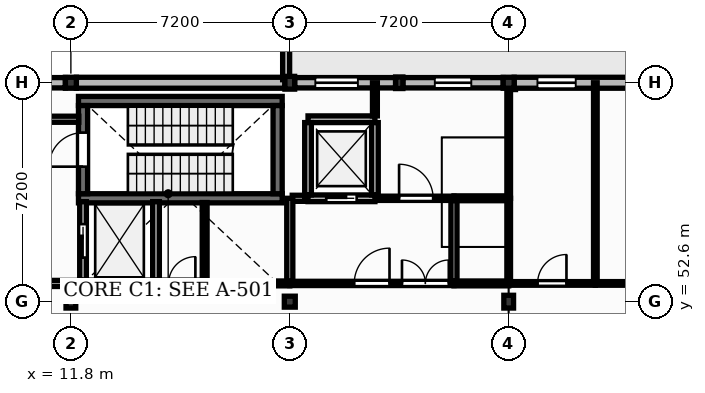
"""IFC4 building model, lengths in metres.
Left out: names, types, materials, properties, quantities, classifications, styles, units other than length and angle.
Written with IfcOpenShell. Run it as: python <this file> out.ifc"""

import sys

from ifc_helpers import new_model, si_unit, direction, frame, frame_2d, origin, origin_2d, place, context, subcontext, project, spatial, rectangle, extrude, element, fill, save


model = new_model("IFC4")
c1 = context("Model", 3, precision=1e-05, world=origin(), true_north=direction((0.0, 1.0)))
c2 = subcontext(c1, "Body", "Model", "MODEL_VIEW")
j1 = project(units=[si_unit("LENGTHUNIT", "METRE"), si_unit("PLANEANGLEUNIT", "RADIAN")], contexts=[c1])
p1 = place(None, origin())
s1 = spatial("IfcSite", under=j1, at=p1, CompositionType="ELEMENT")
p2 = place(p1, origin())
s2 = spatial("IfcBuilding", under=s1, at=p2, CompositionType="ELEMENT")
p3 = place(p2, frame((0.0, 0.0, 4.5)))
s3 = spatial("IfcBuildingStorey", under=s2, at=p3, CompositionType="ELEMENT", Elevation=4.5)
p4 = place(p3, frame((11.8, 52.6, 0.0), z_axis=(0.0, 0.0, 1.0), x_axis=(1.0, 0.0, 0.0)))
e1 = element("IfcColumn", 1, at=p4, inside=s3, PredefinedType="COLUMN", context=c2, shape_type="SweptSolid", body=[
    extrude(rectangle(XDim=0.32, YDim=0.42, at=origin_2d()), origin(), (0.0, 0.0, 1.0), 4.26),
])
for number, where, z_axis, x_axis in (
    (2, (11.8, 59.8, 0.0), (0.0, 0.0, 1.0), (1.0, 0.0, 0.0)),
    (3, (19.0, 52.6, 0.0), (0.0, 0.0, 1.0), (1.0, 0.0, 0.0)),
):
    element("IfcColumn", number, at=place(p3, frame(where, z_axis=z_axis, x_axis=x_axis)), inside=s3, PredefinedType="COLUMN", context=c2, shape_type="SweptSolid", body=[
        extrude(rectangle(XDim=0.36, YDim=0.36, at=origin_2d()), origin(), (0.0, 0.0, 1.0), 4.26),
    ])
for number, where, z_axis, x_axis in (
    (4, (19.0, 59.8, 0.0), (0.0, 0.0, 1.0), (1.0, 0.0, 0.0)),
    (5, (26.2, 52.6, 0.0), (0.0, 0.0, 1.0), (1.0, 0.0, 0.0)),
):
    element("IfcColumn", number, at=place(p3, frame(where, z_axis=z_axis, x_axis=x_axis)), inside=s3, PredefinedType="COLUMN", context=c2, shape_type="SweptSolid", body=[
        extrude(rectangle(XDim=0.32, YDim=0.42, at=origin_2d()), origin(), (0.0, 0.0, 1.0), 4.26),
    ])
p5 = place(p3, frame((26.2, 59.8, 0.0), z_axis=(0.0, 0.0, 1.0), x_axis=(1.0, 0.0, 0.0)))
e6 = element("IfcColumn", 6, at=p5, inside=s3, PredefinedType="COLUMN", context=c2, shape_type="SweptSolid", body=[
    extrude(rectangle(XDim=0.36, YDim=0.36, at=origin_2d()), origin(), (0.0, 0.0, 1.0), 4.26),
])
p6 = place(p3, frame((22.6, 59.8, 0.0), z_axis=(0.0, 0.0, 1.0), x_axis=(1.0, 0.0, 0.0)))
e7 = element("IfcColumn", 7, at=p6, inside=s3, PredefinedType="PILASTER", context=c2, shape_type="SweptSolid", body=[
    extrude(rectangle(XDim=0.24, YDim=0.38, at=origin_2d()), origin(), (0.0, 0.0, 1.0), 4.26),
])
p7 = place(p3, frame((8.32, 59.8, 0.0), z_axis=(0.0, 0.0, 1.0), x_axis=(1.0, 0.0, 0.0)))
e8 = element("IfcWall", 8, at=p7, inside=s3, PredefinedType="SOLIDWALL", context=c2, shape_type="SweptSolid", body=[
    extrude(rectangle(XDim=3.3, YDim=0.34, at=frame_2d((1.65, 0.0))), origin(), (0.0, 0.0, 1.0), 3.8),
])
p8 = place(p7, frame((1.04, 0.0, 1.0)))
e9 = element("IfcOpeningElement", 9, at=p8, cuts=e8, PredefinedType="OPENING", context=c2, shape_type="SweptSolid", body=[
    extrude(rectangle(XDim=1.22, YDim=2.2, at=frame_2d((0.61, 1.1))), frame((0.0, 0.18, 0.0), z_axis=(0.0, -1.0, 0.0), x_axis=(1.0, 0.0, 0.0)), (0.0, 0.0, 1.0), 0.36),
])
p9 = place(p3, frame((11.98, 59.8, 0.0), z_axis=(0.0, 0.0, 1.0), x_axis=(1.0, 0.0, 0.0)))
e10 = element("IfcWall", 10, at=p9, inside=s3, PredefinedType="SOLIDWALL", context=c2, shape_type="SweptSolid", body=[
    extrude(rectangle(XDim=6.86, YDim=0.36, at=frame_2d((3.43, 0.0))), origin(), (0.0, 0.0, 1.0), 3.8),
])
p10 = place(p3, frame((19.16, 59.8, 0.0), z_axis=(0.0, 0.0, 1.0), x_axis=(1.0, 0.0, 0.0)))
e11 = element("IfcWall", 11, at=p10, inside=s3, PredefinedType="SOLIDWALL", context=c2, shape_type="SweptSolid", body=[
    extrude(rectangle(XDim=3.32, YDim=0.34, at=frame_2d((1.66, 0.0))), origin(), (0.0, 0.0, 1.0), 3.8),
])
p11 = place(p10, frame((0.68, 0.0, 1.05)))
e12 = element("IfcOpeningElement", 12, at=p11, cuts=e11, PredefinedType="OPENING", context=c2, shape_type="SweptSolid", body=[
    extrude(rectangle(XDim=1.4, YDim=1.65, at=frame_2d((0.7, 0.825))), frame((0.0, 0.18, 0.0), z_axis=(0.0, -1.0, 0.0), x_axis=(1.0, 0.0, 0.0)), (0.0, 0.0, 1.0), 0.36),
])
p12 = place(p3, frame((22.72, 59.8, 0.0), z_axis=(0.0, 0.0, 1.0), x_axis=(1.0, 0.0, 0.0)))
e13 = element("IfcWall", 13, at=p12, inside=s3, PredefinedType="SOLIDWALL", context=c2, shape_type="SweptSolid", body=[
    extrude(rectangle(XDim=3.3, YDim=0.34, at=frame_2d((1.65, 0.0))), origin(), (0.0, 0.0, 1.0), 3.8),
])
p13 = place(p12, frame((1.05, 0.0, 1.0)))
e14 = element("IfcOpeningElement", 14, at=p13, cuts=e13, PredefinedType="OPENING", context=c2, shape_type="SweptSolid", body=[
    extrude(rectangle(XDim=1.2, YDim=1.95, at=frame_2d((0.6, 0.975))), frame((0.0, 0.18, 0.0), z_axis=(0.0, -1.0, 0.0), x_axis=(1.0, 0.0, 0.0)), (0.0, 0.0, 1.0), 0.36),
])
p14 = place(p3, frame((26.38, 59.8, 0.0), z_axis=(0.0, 0.0, 1.0), x_axis=(1.0, 0.0, 0.0)))
e15 = element("IfcWall", 15, at=p14, inside=s3, PredefinedType="SOLIDWALL", context=c2, shape_type="SweptSolid", body=[
    extrude(rectangle(XDim=6.86, YDim=0.36, at=frame_2d((3.43, 0.0))), origin(), (0.0, 0.0, 1.0), 3.8),
])
p15 = place(p14, frame((0.765, 0.0, 1.05)))
e16 = element("IfcOpeningElement", 16, at=p15, cuts=e15, PredefinedType="OPENING", context=c2, shape_type="SweptSolid", body=[
    extrude(rectangle(XDim=1.26, YDim=1.65, at=frame_2d((0.63, 0.825))), frame((0.0, 0.19, 0.0), z_axis=(0.0, -1.0, 0.0), x_axis=(1.0, 0.0, 0.0)), (0.0, 0.0, 1.0), 0.38),
])
p16 = place(p14, frame((4.035, 0.0, 1.0)))
e17 = element("IfcOpeningElement", 17, at=p16, cuts=e15, PredefinedType="OPENING", context=c2, shape_type="SweptSolid", body=[
    extrude(rectangle(XDim=1.34, YDim=1.95, at=frame_2d((0.67, 0.975))), frame((0.0, 0.19, 0.0), z_axis=(0.0, -1.0, 0.0), x_axis=(1.0, 0.0, 0.0)), (0.0, 0.0, 1.0), 0.38),
])
p17 = place(p3, frame((18.88, 59.9, -0.05), z_axis=(0.0, 0.0, 1.0), x_axis=(0.0, 1.0, 0.0)))
e18 = element("IfcWall", 18, at=p17, inside=s3, PredefinedType="PARAPET", context=c2, shape_type="SweptSolid", body=[
    extrude(rectangle(XDim=1.68, YDim=0.23, at=frame_2d((0.84, 0.0))), origin(), (0.0, 0.0, 1.0), 0.8),
])
for number, where, z_axis, x_axis in (
    (19, (12.05, 56.0, 0.0), (0.0, 0.0, 1.0), (1.0, 0.0, 0.0)),
    (20, (12.05, 59.2, 0.0), (0.0, 0.0, 1.0), (1.0, 0.0, 0.0)),
):
    element("IfcWall", number, at=place(p3, frame(where, z_axis=z_axis, x_axis=x_axis)), inside=s3, PredefinedType="SHEAR", context=c2, shape_type="SweptSolid", body=[
        extrude(rectangle(XDim=6.7, YDim=0.3, at=frame_2d((3.35, 0.0))), origin(), (0.0, 0.0, 1.0), 4.25),
    ])
p18 = place(p3, frame((12.2, 56.15, 0.0), z_axis=(0.0, 0.0, 1.0), x_axis=(0.0, 1.0, 0.0)))
e21 = element("IfcWall", 21, at=p18, inside=s3, PredefinedType="SHEAR", context=c2, shape_type="SweptSolid", body=[
    extrude(rectangle(XDim=2.9, YDim=0.3, at=frame_2d((1.45, 0.0))), origin(), (0.0, 0.0, 1.0), 4.25),
])
p19 = place(p18, frame((0.89, 0.0, 0.0)))
e22 = element("IfcOpeningElement", 22, at=p19, cuts=e21, PredefinedType="OPENING", context=c2, shape_type="SweptSolid", body=[
    extrude(rectangle(XDim=1.12, YDim=2.1, at=frame_2d((0.56, 1.05))), frame((0.0, 0.16, 0.0), z_axis=(0.0, -1.0, 0.0), x_axis=(1.0, 0.0, 0.0)), (0.0, 0.0, 1.0), 0.32),
])
p20 = place(p3, frame((18.6, 56.15, 0.0), z_axis=(0.0, 0.0, 1.0), x_axis=(0.0, 1.0, 0.0)))
e23 = element("IfcWall", 23, at=p20, inside=s3, PredefinedType="SHEAR", context=c2, shape_type="SweptSolid", body=[
    extrude(rectangle(XDim=2.9, YDim=0.3, at=frame_2d((1.45, 0.0))), origin(), (0.0, 0.0, 1.0), 4.25),
])
p21 = place(p3, frame((12.2, 53.2, 0.0), z_axis=(0.0, 0.0, 1.0), x_axis=(1.0, 0.0, 0.0)))
e24 = element("IfcWall", 24, at=p21, inside=s3, PredefinedType="SOLIDWALL", context=c2, shape_type="SweptSolid", body=[
    extrude(rectangle(XDim=2.4, YDim=0.22, at=frame_2d((1.2, 0.0))), origin(), (0.0, 0.0, 1.0), 4.25),
])
p22 = place(p3, frame((12.2, 53.31, 0.0), z_axis=(0.0, 0.0, 1.0), x_axis=(0.0, 1.0, 0.0)))
e25 = element("IfcWall", 25, at=p22, inside=s3, PredefinedType="SOLIDWALL", context=c2, shape_type="SweptSolid", body=[
    extrude(rectangle(XDim=2.58, YDim=0.22, at=frame_2d((1.29, 0.0))), origin(), (0.0, 0.0, 1.0), 4.25),
])
p23 = place(p22, frame((0.74, 0.0, 0.0)))
e26 = element("IfcOpeningElement", 26, at=p23, cuts=e25, PredefinedType="OPENING", context=c2, shape_type="SweptSolid", body=[
    extrude(rectangle(XDim=1.1, YDim=2.15, at=frame_2d((0.55, 1.075))), frame((0.0, 0.12, 0.0), z_axis=(0.0, -1.0, 0.0), x_axis=(1.0, 0.0, 0.0)), (0.0, 0.0, 1.0), 0.24),
])
p24 = place(p3, frame((14.6, 53.31, 0.0), z_axis=(0.0, 0.0, 1.0), x_axis=(0.0, 1.0, 0.0)))
e27 = element("IfcWall", 27, at=p24, inside=s3, PredefinedType="SOLIDWALL", context=c2, shape_type="SweptSolid", body=[
    extrude(rectangle(XDim=2.58, YDim=0.22, at=frame_2d((1.29, 0.0))), origin(), (0.0, 0.0, 1.0), 4.25),
])
p25 = place(p3, frame((19.6, 56.0, 0.0), z_axis=(0.0, 0.0, 1.0), x_axis=(1.0, 0.0, 0.0)))
e28 = element("IfcWall", 28, at=p25, inside=s3, PredefinedType="SOLIDWALL", context=c2, shape_type="SweptSolid", body=[
    extrude(rectangle(XDim=2.2, YDim=0.22, at=frame_2d((1.1, 0.0))), origin(), (0.0, 0.0, 1.0), 4.25),
])
p26 = place(p25, frame((0.6, 0.0, 0.0)))
e29 = element("IfcOpeningElement", 29, at=p26, cuts=e28, PredefinedType="OPENING", context=c2, shape_type="SweptSolid", body=[
    extrude(rectangle(XDim=1.0, YDim=2.15, at=frame_2d((0.5, 1.075))), frame((0.0, 0.12, 0.0), z_axis=(0.0, -1.0, 0.0), x_axis=(1.0, 0.0, 0.0)), (0.0, 0.0, 1.0), 0.24),
])
p27 = place(p3, frame((19.6, 58.6, 0.0), z_axis=(0.0, 0.0, 1.0), x_axis=(1.0, 0.0, 0.0)))
e30 = element("IfcWall", 30, at=p27, inside=s3, PredefinedType="SOLIDWALL", context=c2, shape_type="SweptSolid", body=[
    extrude(rectangle(XDim=2.2, YDim=0.22, at=frame_2d((1.1, 0.0))), origin(), (0.0, 0.0, 1.0), 4.25),
])
for number, where, z_axis, x_axis in (
    (31, (19.6, 56.11, 0.0), (0.0, 0.0, 1.0), (0.0, 1.0, 0.0)),
    (32, (21.8, 56.11, 0.0), (0.0, 0.0, 1.0), (0.0, 1.0, 0.0)),
):
    element("IfcWall", number, at=place(p3, frame(where, z_axis=z_axis, x_axis=x_axis)), inside=s3, PredefinedType="SOLIDWALL", context=c2, shape_type="SweptSolid", body=[
        extrude(rectangle(XDim=2.38, YDim=0.22, at=frame_2d((1.19, 0.0))), origin(), (0.0, 0.0, 1.0), 4.25),
    ])
p28 = place(p3, frame((7.8, 53.2, 0.0), z_axis=(0.0, 0.0, 1.0), x_axis=(1.0, 0.0, 0.0)))
e33 = element("IfcWall", 33, at=p28, inside=s3, PredefinedType="PARTITIONING", context=c2, shape_type="SweptSolid", body=[
    extrude(rectangle(XDim=4.29, YDim=0.2, at=frame_2d((2.145, 0.0))), origin(), (0.0, 0.0, 1.0), 4.18),
])
p29 = place(p28, frame((1.405, 0.0, 0.0)))
e34 = element("IfcOpeningElement", 34, at=p29, cuts=e33, PredefinedType="OPENING", context=c2, shape_type="SweptSolid", body=[
    extrude(rectangle(XDim=1.48, YDim=2.25, at=frame_2d((0.74, 1.125))), frame((0.0, 0.11, 0.0), z_axis=(0.0, -1.0, 0.0), x_axis=(1.0, 0.0, 0.0)), (0.0, 0.0, 1.0), 0.22),
])
p30 = place(p3, frame((14.71, 53.2, 0.0), z_axis=(0.0, 0.0, 1.0), x_axis=(1.0, 0.0, 0.0)))
e35 = element("IfcWall", 35, at=p30, inside=s3, PredefinedType="SOLIDWALL", context=c2, shape_type="SweptSolid", body=[
    extrude(rectangle(XDim=1.49, YDim=0.22, at=frame_2d((0.745, 0.0))), origin(), (0.0, 0.0, 1.0), 4.18),
])
p31 = place(p30, frame((0.305, 0.0, 0.0)))
e36 = element("IfcOpeningElement", 36, at=p31, cuts=e35, PredefinedType="OPENING", context=c2, shape_type="SweptSolid", body=[
    extrude(rectangle(XDim=0.88, YDim=2.05, at=frame_2d((0.44, 1.025))), frame((0.0, 0.12, 0.0), z_axis=(0.0, -1.0, 0.0), x_axis=(1.0, 0.0, 0.0)), (0.0, 0.0, 1.0), 0.24),
])
p32 = place(p3, frame((19.0, 53.2, 0.0), z_axis=(0.0, 0.0, 1.0), x_axis=(1.0, 0.0, 0.0)))
e37 = element("IfcWall", 37, at=p32, inside=s3, PredefinedType="PARTITIONING", context=c2, shape_type="SweptSolid", body=[
    extrude(rectangle(XDim=5.4, YDim=0.14, at=frame_2d((2.7, 0.0))), origin(), (0.0, 0.0, 1.0), 4.18),
])
p33 = place(p32, frame((2.12, 0.0, 0.0)))
e38 = element("IfcOpeningElement", 38, at=p33, cuts=e37, PredefinedType="OPENING", context=c2, shape_type="SweptSolid", body=[
    extrude(rectangle(XDim=1.16, YDim=2.1, at=frame_2d((0.58, 1.05))), frame((0.0, 0.08, 0.0), z_axis=(0.0, -1.0, 0.0), x_axis=(1.0, 0.0, 0.0)), (0.0, 0.0, 1.0), 0.16),
])
p34 = place(p32, frame((3.69, 0.0, 0.0)))
e39 = element("IfcOpeningElement", 39, at=p34, cuts=e37, PredefinedType="OPENING", context=c2, shape_type="SweptSolid", body=[
    extrude(rectangle(XDim=1.54, YDim=2.25, at=frame_2d((0.77, 1.125))), frame((0.0, 0.08, 0.0), z_axis=(0.0, -1.0, 0.0), x_axis=(1.0, 0.0, 0.0)), (0.0, 0.0, 1.0), 0.16),
])
p35 = place(p3, frame((21.91, 56.0, 0.0), z_axis=(0.0, 0.0, 1.0), x_axis=(1.0, 0.0, 0.0)))
e40 = element("IfcWall", 40, at=p35, inside=s3, PredefinedType="PARTITIONING", context=c2, shape_type="SweptSolid", body=[
    extrude(rectangle(XDim=2.49, YDim=0.14, at=frame_2d((1.245, 0.0))), origin(), (0.0, 0.0, 1.0), 4.18),
])
p36 = place(p35, frame((0.685, 0.0, 0.0)))
e41 = element("IfcOpeningElement", 41, at=p36, cuts=e40, PredefinedType="OPENING", context=c2, shape_type="SweptSolid", body=[
    extrude(rectangle(XDim=1.12, YDim=2.15, at=frame_2d((0.56, 1.075))), frame((0.0, 0.08, 0.0), z_axis=(0.0, -1.0, 0.0), x_axis=(1.0, 0.0, 0.0)), (0.0, 0.0, 1.0), 0.16),
])
p37 = place(p3, frame((26.2, 53.2, 0.0), z_axis=(0.0, 0.0, 1.0), x_axis=(1.0, 0.0, 0.0)))
e42 = element("IfcWall", 42, at=p37, inside=s3, PredefinedType="PLUMBINGWALL", context=c2, shape_type="SweptSolid", body=[
    extrude(rectangle(XDim=2.85, YDim=0.12, at=frame_2d((1.425, 0.0))), origin(), (0.0, 0.0, 1.0), 4.18),
])
p38 = place(p37, frame((0.95, 0.0, 0.0)))
e43 = element("IfcOpeningElement", 43, at=p38, cuts=e42, PredefinedType="OPENING", context=c2, shape_type="SweptSolid", body=[
    extrude(rectangle(XDim=0.95, YDim=2.1, at=frame_2d((0.475, 1.05))), frame((0.0, 0.07, 0.0), z_axis=(0.0, -1.0, 0.0), x_axis=(1.0, 0.0, 0.0)), (0.0, 0.0, 1.0), 0.14),
])
p39 = place(p3, frame((26.2, 56.0, 0.0), z_axis=(0.0, 0.0, 1.0), x_axis=(0.0, 1.0, 0.0)))
e44 = element("IfcWall", 44, at=p39, inside=s3, PredefinedType="PLUMBINGWALL", context=c2, shape_type="SweptSolid", body=[
    extrude(rectangle(XDim=3.62, YDim=0.12, at=frame_2d((1.81, 0.0))), origin(), (0.0, 0.0, 1.0), 3.74),
])
p40 = place(p3, frame((29.05, 53.27, 0.0), z_axis=(0.0, 0.0, 1.0), x_axis=(0.0, 1.0, 0.0)))
e45 = element("IfcWall", 45, at=p40, inside=s3, PredefinedType="PLUMBINGWALL", context=c2, shape_type="SweptSolid", body=[
    extrude(rectangle(XDim=6.53, YDim=0.12, at=frame_2d((3.265, 0.0))), origin(), (0.0, 0.0, 1.0), 4.18),
])
p41 = place(p3, frame((29.05, 53.2, 0.0), z_axis=(0.0, 0.0, 1.0), x_axis=(1.0, 0.0, 0.0)))
e46 = element("IfcWall", 46, at=p41, inside=s3, PredefinedType="PLUMBINGWALL", context=c2, shape_type="SweptSolid", body=[
    extrude(rectangle(XDim=4.35, YDim=0.12, at=frame_2d((2.175, 0.0))), origin(), (0.0, 0.0, 1.0), 4.18),
])
p42 = place(p41, frame((1.7, 0.0, 0.0)))
e47 = element("IfcOpeningElement", 47, at=p42, cuts=e46, PredefinedType="OPENING", context=c2, shape_type="SweptSolid", body=[
    extrude(rectangle(XDim=0.95, YDim=2.1, at=frame_2d((0.475, 1.05))), frame((0.0, 0.07, 0.0), z_axis=(0.0, -1.0, 0.0), x_axis=(1.0, 0.0, 0.0)), (0.0, 0.0, 1.0), 0.14),
])
p43 = place(p3, frame((16.2, 53.27, 0.0), z_axis=(0.0, 0.0, 1.0), x_axis=(0.0, 1.0, 0.0)))
e48 = element("IfcWall", 48, at=p43, inside=s3, PredefinedType="PARTITIONING", context=c2, shape_type="SweptSolid", body=[
    extrude(rectangle(XDim=2.59, YDim=0.16, at=frame_2d((1.295, 0.0))), origin(), (0.0, 0.0, 1.0), 4.18),
])
p44 = place(p3, frame((12.06, 58.6, 0.0), z_axis=(0.0, 0.0, 1.0), x_axis=(-1.0, 0.0, 0.0)))
e49 = element("IfcWall", 49, at=p44, inside=s3, PredefinedType="PARTITIONING", context=c2, shape_type="SweptSolid", body=[
    extrude(rectangle(XDim=4.26, YDim=0.2, at=frame_2d((2.13, 0.0))), origin(), (0.0, 0.0, 1.0), 4.18),
])
p45 = place(p3, frame((24.4, 53.27, 0.0), z_axis=(0.0, 0.0, 1.0), x_axis=(0.0, 1.0, 0.0)))
e50 = element("IfcWall", 50, at=p45, inside=s3, PredefinedType="PARTITIONING", context=c2, shape_type="SweptSolid", body=[
    extrude(rectangle(XDim=2.66, YDim=0.2, at=frame_2d((1.33, 0.0))), origin(), (0.0, 0.0, 1.0), 4.18),
])
p46 = place(p3, frame((19.49, 56.0, 0.0), z_axis=(0.0, 0.0, 1.0), x_axis=(-1.0, 0.0, 0.0)))
e51 = element("IfcWall", 51, at=p46, inside=s3, PredefinedType="PARTITIONING", context=c2, shape_type="SweptSolid", body=[
    extrude(rectangle(XDim=0.41, YDim=0.2, at=frame_2d((0.205, 0.0))), origin(), (0.0, 0.0, 1.0), 4.18),
])
p47 = place(p3, frame((19.0, 53.27, 0.0), z_axis=(0.0, 0.0, 1.0), x_axis=(0.0, 1.0, 0.0)))
e52 = element("IfcWall", 52, at=p47, inside=s3, PredefinedType="PARTITIONING", context=c2, shape_type="SweptSolid", body=[
    extrude(rectangle(XDim=2.73, YDim=0.2, at=frame_2d((1.365, 0.0))), origin(), (0.0, 0.0, 1.0), 3.74),
])
p48 = place(p3, frame((26.2, 53.2, 0.0), z_axis=(0.0, 0.0, 1.0), x_axis=(-1.0, 0.0, 0.0)))
e53 = element("IfcWall", 53, at=p48, inside=s3, PredefinedType="PARTITIONING", context=c2, shape_type="SweptSolid", body=[
    extrude(rectangle(XDim=1.8, YDim=0.16, at=frame_2d((0.9, 0.0))), origin(), (0.0, 0.0, 1.0), 4.18),
])
p49 = place(p3, frame((19.0, 53.2, 0.0), z_axis=(0.0, 0.0, 1.0), x_axis=(-1.0, 0.0, 0.0)))
e54 = element("IfcWall", 54, at=p49, inside=s3, PredefinedType="PARTITIONING", context=c2, shape_type="SweptSolid", body=[
    extrude(rectangle(XDim=2.8, YDim=0.16, at=frame_2d((1.4, 0.0))), origin(), (0.0, 0.0, 1.0), 4.18),
])
p50 = place(p3, frame((26.2, 53.27, 0.0), z_axis=(0.0, 0.0, 1.0), x_axis=(0.0, 1.0, 0.0)))
e55 = element("IfcWall", 55, at=p50, inside=s3, PredefinedType="PLUMBINGWALL", context=c2, shape_type="SweptSolid", body=[
    extrude(rectangle(XDim=2.73, YDim=0.12, at=frame_2d((1.365, 0.0))), origin(), (0.0, 0.0, 1.0), 3.74),
])
p51 = place(p3, frame((24.4, 56.0, 0.0), z_axis=(0.0, 0.0, 1.0), x_axis=(1.0, 0.0, 0.0)))
e56 = element("IfcWall", 56, at=p51, inside=s3, PredefinedType="PARTITIONING", context=c2, shape_type="SweptSolid", body=[
    extrude(rectangle(XDim=1.8, YDim=0.16, at=frame_2d((0.9, 0.0))), origin(), (0.0, 0.0, 1.0), 4.18),
])
p52 = place(p3, frame((21.8, 58.71, 0.0), z_axis=(0.0, 0.0, 1.0), x_axis=(0.0, 1.0, 0.0)))
e57 = element("IfcWall", 57, at=p52, inside=s3, PredefinedType="PARTITIONING", context=c2, shape_type="SweptSolid", body=[
    extrude(rectangle(XDim=1.09, YDim=0.16, at=frame_2d((0.545, 0.0))), origin(), (0.0, 0.0, 1.0), 4.18),
])
p53 = place(p11, origin())
e58 = element("IfcWindow", 58, at=p53, inside=s3, PartitioningType="SINGLE_PANEL", PredefinedType="WINDOW", context=c2, shape_type="SweptSolid", body=[
    extrude(rectangle(XDim=1.4, YDim=1.65, at=frame_2d((0.7, 0.825))), frame((0.0, 0.03, 0.0), z_axis=(0.0, -1.0, 0.0), x_axis=(1.0, 0.0, 0.0)), (0.0, 0.0, 1.0), 0.06),
])
fill(e12, e58)
p54 = place(p13, origin())
e59 = element("IfcWindow", 59, at=p54, inside=s3, PartitioningType="SINGLE_PANEL", PredefinedType="WINDOW", context=c2, shape_type="SweptSolid", body=[
    extrude(rectangle(XDim=1.2, YDim=1.95, at=frame_2d((0.6, 0.975))), frame((0.0, 0.03, 0.0), z_axis=(0.0, -1.0, 0.0), x_axis=(1.0, 0.0, 0.0)), (0.0, 0.0, 1.0), 0.06),
])
fill(e14, e59)
p55 = place(p15, origin())
e60 = element("IfcWindow", 60, at=p55, inside=s3, PartitioningType="SINGLE_PANEL", PredefinedType="WINDOW", context=c2, shape_type="SweptSolid", body=[
    extrude(rectangle(XDim=1.26, YDim=1.65, at=frame_2d((0.63, 0.825))), frame((0.0, 0.03, 0.0), z_axis=(0.0, -1.0, 0.0), x_axis=(1.0, 0.0, 0.0)), (0.0, 0.0, 1.0), 0.06),
])
fill(e16, e60)
p56 = place(p23, origin())
e61 = element("IfcDoor", 61, at=p56, inside=s3, OperationType="SLIDING_TO_LEFT", PredefinedType="DOOR", context=c2, shape_type="SweptSolid", body=[
    extrude(rectangle(XDim=1.1, YDim=2.15, at=frame_2d((0.55, 1.075))), frame((0.0, 0.025, 0.0), z_axis=(0.0, -1.0, 0.0), x_axis=(1.0, 0.0, 0.0)), (0.0, 0.0, 1.0), 0.05),
])
fill(e26, e61)
p57 = place(p26, origin())
e62 = element("IfcDoor", 62, at=p57, inside=s3, OperationType="SLIDING_TO_LEFT", PredefinedType="DOOR", context=c2, shape_type="SweptSolid", body=[
    extrude(rectangle(XDim=1.0, YDim=2.15, at=frame_2d((0.5, 1.075))), frame((0.0, 0.025, 0.0), z_axis=(0.0, -1.0, 0.0), x_axis=(1.0, 0.0, 0.0)), (0.0, 0.0, 1.0), 0.05),
])
fill(e29, e62)
p58 = place(p19, origin())
e63 = element("IfcDoor", 63, at=p58, inside=s3, OperationType="SINGLE_SWING_LEFT", PredefinedType="DOOR", context=c2, shape_type="SweptSolid", body=[
    extrude(rectangle(XDim=1.12, YDim=2.1, at=frame_2d((0.56, 1.05))), frame((0.0, 0.025, 0.0), z_axis=(0.0, -1.0, 0.0), x_axis=(1.0, 0.0, 0.0)), (0.0, 0.0, 1.0), 0.05),
])
fill(e22, e63)
p59 = place(p33, origin())
e64 = element("IfcDoor", 64, at=p59, inside=s3, OperationType="SINGLE_SWING_RIGHT", PredefinedType="DOOR", context=c2, shape_type="SweptSolid", body=[
    extrude(rectangle(XDim=1.16, YDim=2.1, at=frame_2d((0.58, 1.05))), frame((0.0, 0.025, 0.0), z_axis=(0.0, -1.0, 0.0), x_axis=(1.0, 0.0, 0.0)), (0.0, 0.0, 1.0), 0.05),
])
fill(e38, e64)
p60 = place(p34, origin())
e65 = element("IfcDoor", 65, at=p60, inside=s3, OperationType="DOUBLE_DOOR_SINGLE_SWING", PredefinedType="DOOR", context=c2, shape_type="SweptSolid", body=[
    extrude(rectangle(XDim=1.54, YDim=2.25, at=frame_2d((0.77, 1.125))), frame((0.0, 0.025, 0.0), z_axis=(0.0, -1.0, 0.0), x_axis=(1.0, 0.0, 0.0)), (0.0, 0.0, 1.0), 0.05),
])
fill(e39, e65)
p61 = place(p31, origin())
e66 = element("IfcDoor", 66, at=p61, inside=s3, OperationType="SINGLE_SWING_RIGHT", PredefinedType="DOOR", context=c2, shape_type="SweptSolid", body=[
    extrude(rectangle(XDim=0.88, YDim=2.05, at=frame_2d((0.44, 1.025))), frame((0.0, 0.025, 0.0), z_axis=(0.0, -1.0, 0.0), x_axis=(1.0, 0.0, 0.0)), (0.0, 0.0, 1.0), 0.05),
])
fill(e36, e66)
p62 = place(p38, origin())
e67 = element("IfcDoor", 67, at=p62, inside=s3, OperationType="SINGLE_SWING_RIGHT", PredefinedType="DOOR", context=c2, shape_type="SweptSolid", body=[
    extrude(rectangle(XDim=0.95, YDim=2.1, at=frame_2d((0.475, 1.05))), frame((0.0, 0.025, 0.0), z_axis=(0.0, -1.0, 0.0), x_axis=(1.0, 0.0, 0.0)), (0.0, 0.0, 1.0), 0.05),
])
fill(e43, e67)
p63 = place(p36, origin())
e68 = element("IfcDoor", 68, at=p63, inside=s3, OperationType="SINGLE_SWING_LEFT", PredefinedType="DOOR", context=c2, shape_type="SweptSolid", body=[
    extrude(rectangle(XDim=1.12, YDim=2.15, at=frame_2d((0.56, 1.075))), frame((0.0, 0.025, 0.0), z_axis=(0.0, -1.0, 0.0), x_axis=(1.0, 0.0, 0.0)), (0.0, 0.0, 1.0), 0.05),
])
fill(e41, e68)
save(model, sys.argv[1])
